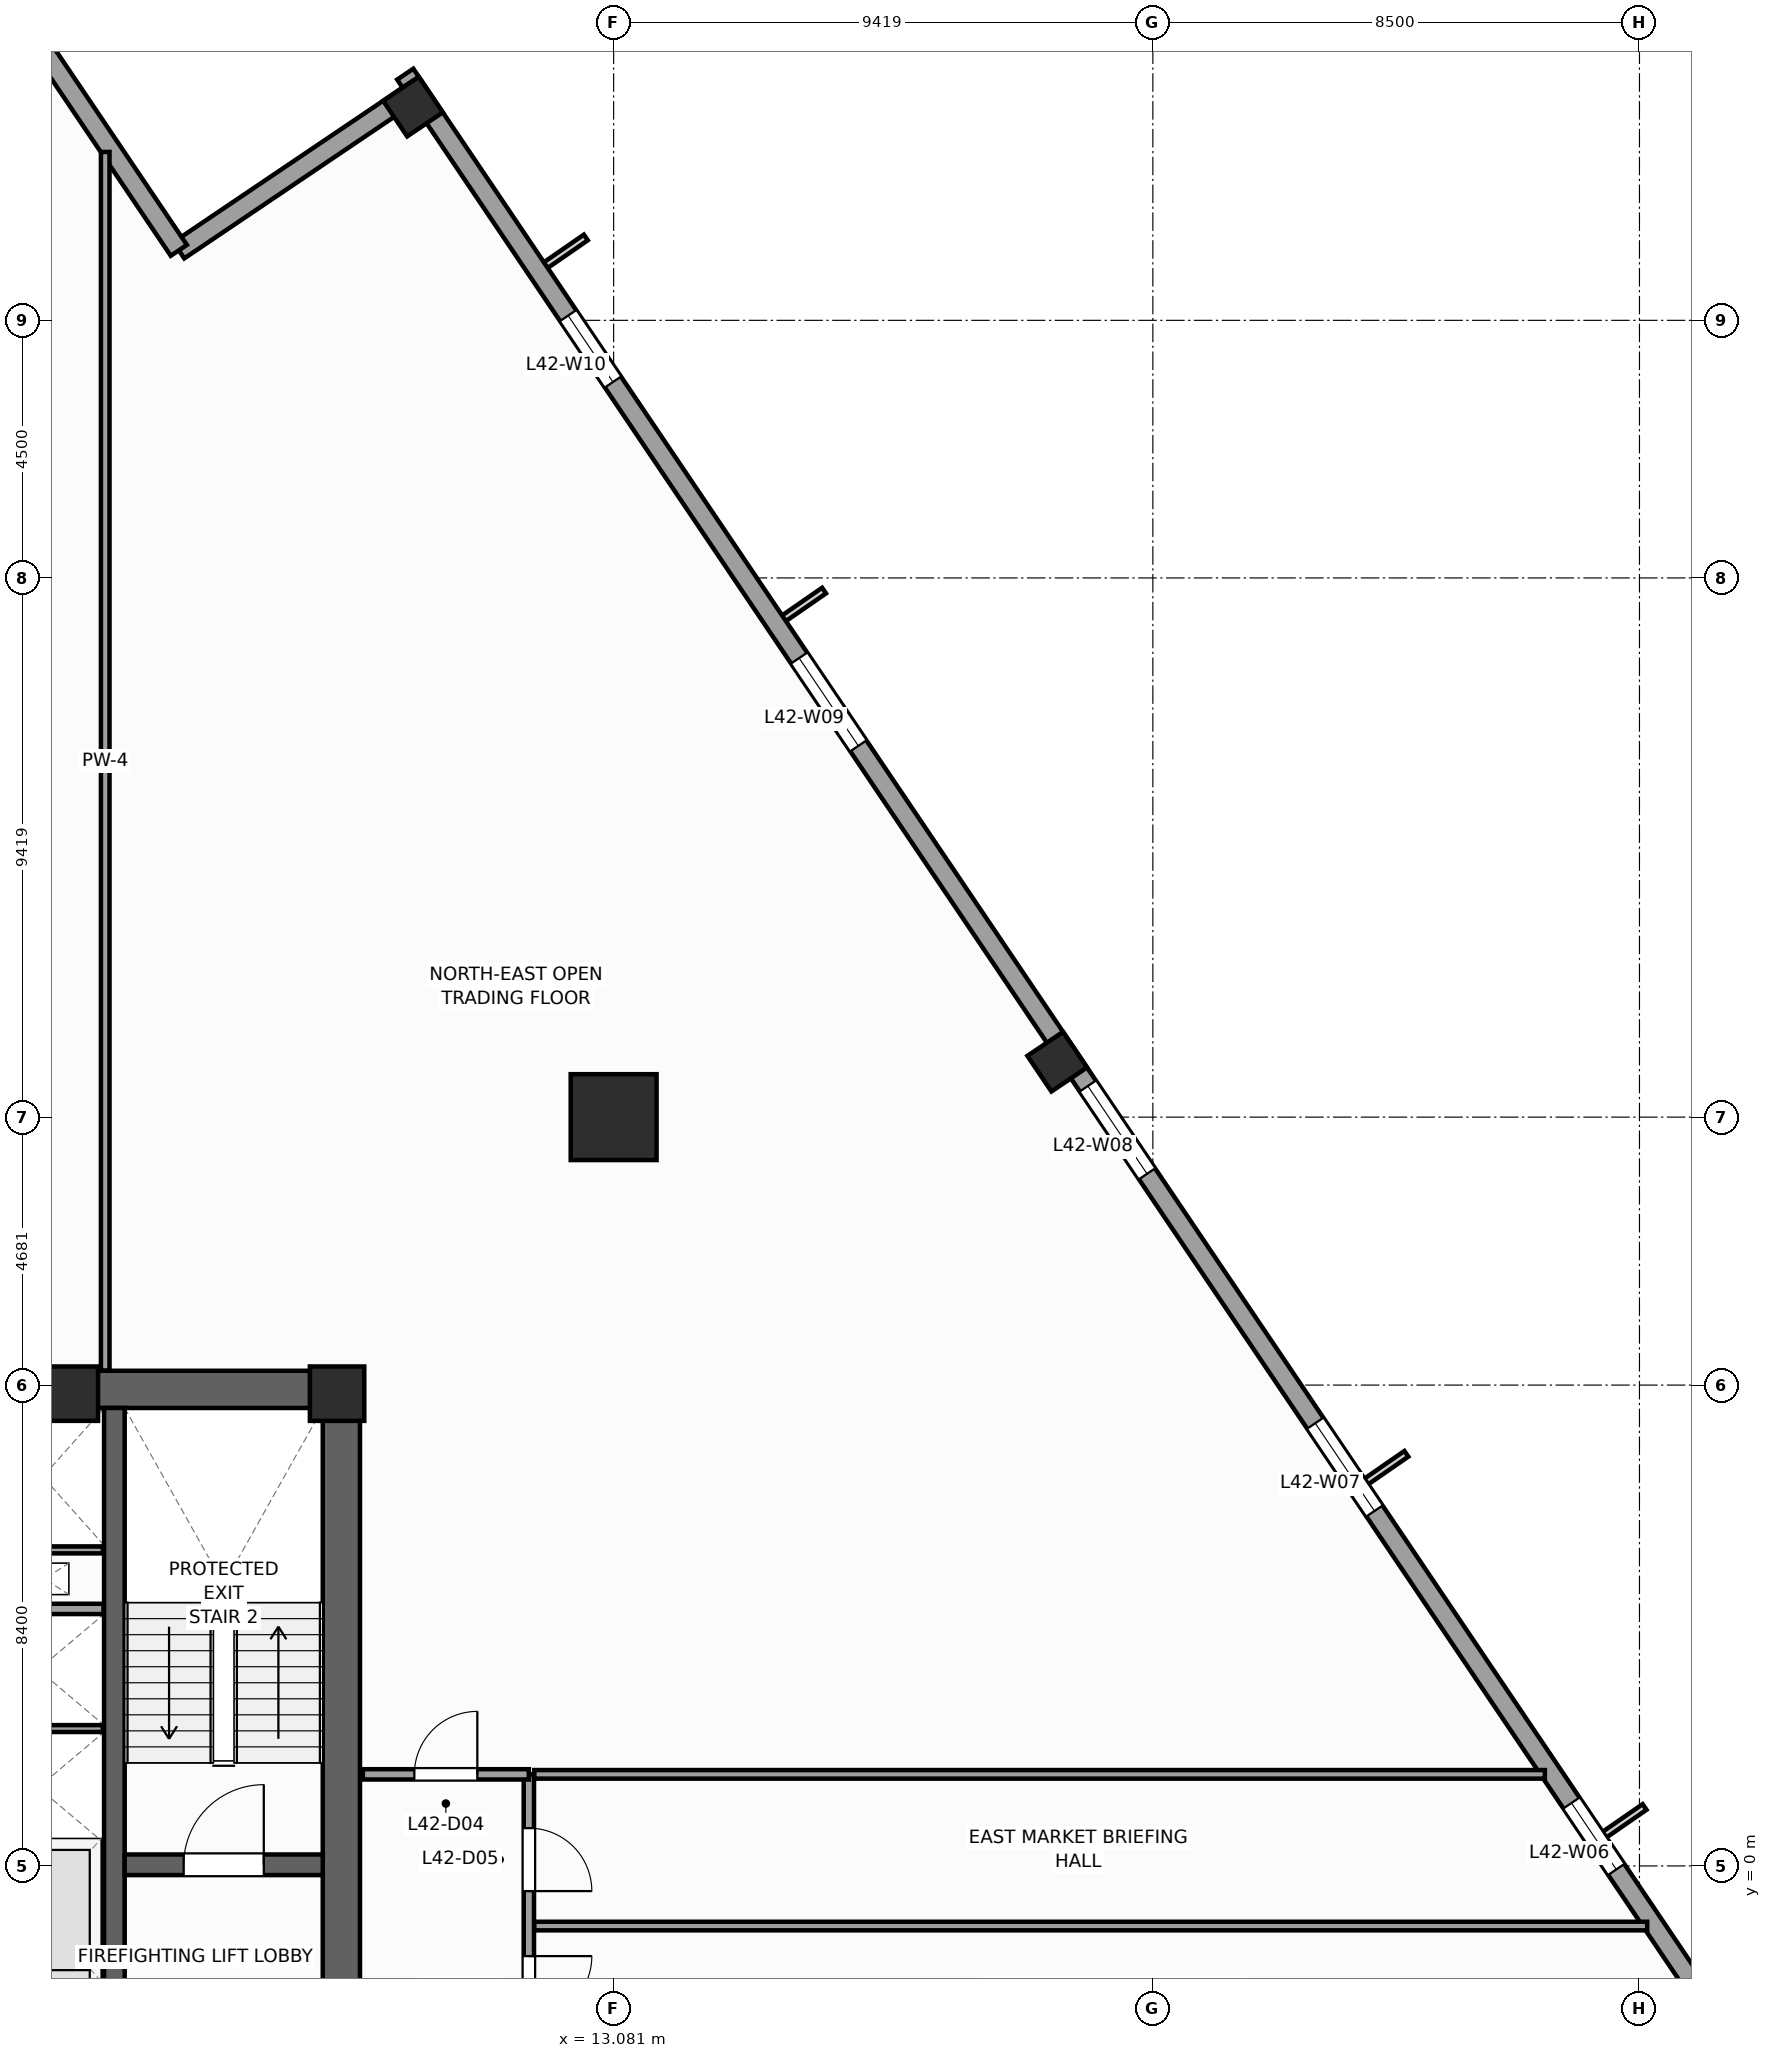
"""IFC4 building model, lengths in metres.
Left out: names, types, materials, properties, quantities, classifications, styles, units other than length and angle.
Written with IfcOpenShell. Run it as: python <this file> out.ifc"""

import sys

from ifc_helpers import new_model, si_unit, direction, frame, frame_2d, origin, origin_2d, place, context, subcontext, project, spatial, rectangle, extrude, source, transform, mapped, element, fill, save


model = new_model("IFC4")
c1 = context("Model", 3, precision=1e-05, world=origin(), true_north=direction((0.0, 1.0)))
c2 = subcontext(c1, "Body", "Model", "MODEL_VIEW")
j1 = project(units=[si_unit("LENGTHUNIT", "METRE"), si_unit("PLANEANGLEUNIT", "RADIAN")], contexts=[c1])
p1 = place(None, origin())
s1 = spatial("IfcSite", under=j1, at=p1, CompositionType="ELEMENT")
p2 = place(p1, origin())
s2 = spatial("IfcBuilding", under=s1, at=p2, CompositionType="ELEMENT")
p3 = place(p2, frame((0.0, 0.0, 176.4)))
s3 = spatial("IfcBuildingStorey", under=s2, at=p3, CompositionType="ELEMENT", Elevation=176.4)
p4 = place(p3, frame((-8.65, 8.325, 0.0), z_axis=(0.0, 0.0, 1.0), x_axis=(1.0, 0.0, 0.0)))
e1 = element("IfcWall", 1, at=p4, inside=s3, PredefinedType="SHEAR", context=c2, shape_type="SweptSolid", body=[
    extrude(rectangle(XDim=17.3, YDim=0.65, at=frame_2d((8.65, 0.0))), origin(), (0.0, 0.0, 1.0), 4.0),
])
p5 = place(p3, frame((8.325, -8.0, 0.0), z_axis=(0.0, 0.0, 1.0), x_axis=(0.0, 1.0, 0.0)))
e2 = element("IfcWall", 2, at=p5, inside=s3, PredefinedType="SHEAR", context=c2, shape_type="SweptSolid", body=[
    extrude(rectangle(XDim=16.0, YDim=0.65, at=frame_2d((8.0, 0.0))), origin(), (0.0, 0.0, 1.0), 4.0),
])
p6 = place(p5, frame((4.69, 0.0, 0.0)))
e3 = element("IfcOpeningElement", 3, at=p6, cuts=e2, PredefinedType="OPENING", context=c2, shape_type="SweptSolid", body=[
    extrude(rectangle(XDim=1.3, YDim=2.2, at=frame_2d((0.65, 1.1))), frame((0.0, 0.335, 0.0), z_axis=(0.0, -1.0, 0.0), x_axis=(1.0, 0.0, 0.0)), (0.0, 0.0, 1.0), 0.67),
])
p7 = place(p3, frame((4.36, -8.0, 0.0), z_axis=(0.0, 0.0, 1.0), x_axis=(0.0, 1.0, 0.0)))
e4 = element("IfcWall", 4, at=p7, inside=s3, PredefinedType="SHEAR", context=c2, shape_type="SweptSolid", body=[
    extrude(rectangle(XDim=16.0, YDim=0.36, at=frame_2d((8.0, 0.0))), origin(), (0.0, 0.0, 1.0), 4.0),
])
p8 = place(p3, frame((4.54, 0.02, 0.0), z_axis=(0.0, 0.0, 1.0), x_axis=(1.0, 0.0, 0.0)))
e5 = element("IfcWall", 5, at=p8, inside=s3, PredefinedType="SHEAR", context=c2, shape_type="SweptSolid", body=[
    extrude(rectangle(XDim=3.46, YDim=0.36, at=frame_2d((1.73, 0.0))), origin(), (0.0, 0.0, 1.0), 4.0),
])
p9 = place(p8, frame((1.03, 0.0, 0.0)))
e6 = element("IfcOpeningElement", 6, at=p9, cuts=e5, PredefinedType="OPENING", context=c2, shape_type="SweptSolid", body=[
    extrude(rectangle(XDim=1.4, YDim=2.2, at=frame_2d((0.7, 1.1))), frame((0.0, 0.19, 0.0), z_axis=(0.0, -1.0, 0.0), x_axis=(1.0, 0.0, 0.0)), (0.0, 0.0, 1.0), 0.38),
])
m1 = source(origin(), c2, "Body", "SweptSolid", [
    extrude(rectangle(XDim=0.95, YDim=0.95, at=origin_2d()), origin(), (0.0, 0.0, 1.0), 4.0),
])
for number, where, z_axis, x_axis in (
    (7, (8.25, 8.25, 0.0), (0.0, 0.0, 1.0), (1.0, 0.0, 0.0)),
    (8, (3.6, 8.25, 0.0), (0.0, 0.0, 1.0), (1.0, 0.0, 0.0)),
):
    element("IfcColumn", number, at=place(p3, frame(where, z_axis=z_axis, x_axis=x_axis)), inside=s3, PredefinedType="PILASTER", context=c2, shape_type="MappedRepresentation", body=[
        mapped(m1, transform((0.0, 0.0, 0.0), scale=1.0)),
    ])
m2 = source(origin(), c2, "Body", "SweptSolid", [
    extrude(rectangle(XDim=1.5, YDim=1.5, at=origin_2d()), origin(), (0.0, 0.0, 1.0), 4.0),
])
p10 = place(p3, frame((13.081, 13.081, 0.0), z_axis=(0.0, 0.0, 1.0), x_axis=(1.0, 0.0, 0.0)))
e9 = element("IfcColumn", 9, at=p10, inside=s3, PredefinedType="COLUMN", context=c2, shape_type="MappedRepresentation", body=[
    mapped(m2, transform((0.0, 0.0, 0.0), scale=1.0)),
])
m3 = source(origin(), c2, "Body", "SweptSolid", [
    extrude(rectangle(XDim=0.75, YDim=0.75, at=origin_2d()), origin(), (0.0, 0.0, 1.0), 4.0),
])
for number, where, z_axis, x_axis in (
    (10, (20.83, 14.05, 0.0), (0.0, 0.0, 1.0), (0.829, 0.559, 0.0)),
    (11, (9.576, 30.734, 0.0), (0.0, 0.0, 1.0), (0.829, 0.559, 0.0)),
):
    element("IfcColumn", number, at=place(p3, frame(where, z_axis=z_axis, x_axis=x_axis)), inside=s3, PredefinedType="COLUMN", context=c2, shape_type="MappedRepresentation", body=[
        mapped(m3, transform((0.0, 0.0, 0.0), scale=1.0)),
    ])
p11 = place(p3, frame((32.558, -2.972, 0.0), z_axis=(0.0, 0.0, 1.0), x_axis=(-0.559194910251, 0.829036218961, 0.0)))
e12 = element("IfcWall", 12, at=p11, inside=s3, PredefinedType="STANDARD", context=c2, shape_type="SweptSolid", body=[
    extrude(rectangle(XDim=41.34, YDim=0.34, at=frame_2d((20.67, 0.0))), origin(), (0.0, 0.0, 1.0), 3.04),
])
p12 = place(p11, frame((3.511, 0.0, 0.56)))
e13 = element("IfcOpeningElement", 13, at=p12, cuts=e12, PredefinedType="OPENING", context=c2, shape_type="SweptSolid", body=[
    extrude(rectangle(XDim=1.4, YDim=2.4, at=frame_2d((0.7, 1.2))), frame((0.0, 0.18, 0.0), z_axis=(0.0, -1.0, 0.0), x_axis=(1.0, 0.0, 0.0)), (0.0, 0.0, 1.0), 0.36),
])
p13 = place(p11, frame((11.064, 0.0, 0.61)))
e14 = element("IfcOpeningElement", 14, at=p13, cuts=e12, PredefinedType="OPENING", context=c2, shape_type="SweptSolid", body=[
    extrude(rectangle(XDim=1.85, YDim=2.35, at=frame_2d((0.925, 1.175))), frame((0.0, 0.18, 0.0), z_axis=(0.0, -1.0, 0.0), x_axis=(1.0, 0.0, 0.0)), (0.0, 0.0, 1.0), 0.36),
])
p14 = place(p11, frame((18.168, 0.0, 0.61)))
e15 = element("IfcOpeningElement", 15, at=p14, cuts=e12, PredefinedType="OPENING", context=c2, shape_type="SweptSolid", body=[
    extrude(rectangle(XDim=1.85, YDim=2.35, at=frame_2d((0.925, 1.175))), frame((0.0, 0.18, 0.0), z_axis=(0.0, -1.0, 0.0), x_axis=(1.0, 0.0, 0.0)), (0.0, 0.0, 1.0), 0.36),
])
p15 = place(p11, frame((27.186, 0.0, 0.61)))
e16 = element("IfcOpeningElement", 16, at=p15, cuts=e12, PredefinedType="OPENING", context=c2, shape_type="SweptSolid", body=[
    extrude(rectangle(XDim=1.85, YDim=2.35, at=frame_2d((0.925, 1.175))), frame((0.0, 0.18, 0.0), z_axis=(0.0, -1.0, 0.0), x_axis=(1.0, 0.0, 0.0)), (0.0, 0.0, 1.0), 0.36),
])
p16 = place(p11, frame((34.852, 0.0, 0.56)))
e17 = element("IfcOpeningElement", 17, at=p16, cuts=e12, PredefinedType="OPENING", context=c2, shape_type="SweptSolid", body=[
    extrude(rectangle(XDim=1.4, YDim=2.4, at=frame_2d((0.7, 1.2))), frame((0.0, 0.18, 0.0), z_axis=(0.0, -1.0, 0.0), x_axis=(1.0, 0.0, 0.0)), (0.0, 0.0, 1.0), 0.36),
])
p17 = place(p3, frame((9.631, 31.019, 0.0), z_axis=(0.0, 0.0, 1.0), x_axis=(-0.829025804298, -0.559210350234, 0.0)))
e18 = element("IfcWall", 18, at=p17, inside=s3, PredefinedType="STANDARD", context=c2, shape_type="SweptSolid", body=[
    extrude(rectangle(XDim=5.0, YDim=0.34, at=frame_2d((2.5, 0.0))), origin(), (0.0, 0.0, 1.0), 3.74),
])
p18 = place(p3, frame((5.486, 28.223, 0.0), z_axis=(0.0, 0.0, 1.0), x_axis=(-0.559171107879, 0.82905227345, 0.0)))
e19 = element("IfcWall", 19, at=p18, inside=s3, PredefinedType="STANDARD", context=c2, shape_type="SweptSolid", body=[
    extrude(rectangle(XDim=5.17, YDim=0.34, at=frame_2d((2.585, 0.0))), origin(), (0.0, 0.0, 1.0), 3.04),
])
for number, where, z_axis, x_axis in (
    (20, (1.89, 0.3, 0.0), (0.0, 0.0, 1.0), (1.0, 0.0, 0.0)),
    (21, (1.89, 4.49, 0.0), (0.0, 0.0, 1.0), (1.0, 0.0, 0.0)),
):
    element("IfcWall", number, at=place(p3, frame(where, z_axis=z_axis, x_axis=x_axis)), inside=s3, PredefinedType="PARTITIONING", context=c2, shape_type="SweptSolid", body=[
        extrude(rectangle(XDim=2.28, YDim=0.18, at=frame_2d((1.14, 0.0))), origin(), (0.0, 0.0, 1.0), 3.74),
    ])
for number, where, z_axis, x_axis in (
    (22, (1.9, -1.8, 0.0), (0.0, 0.0, 1.0), (1.0, 0.0, 0.0)),
    (23, (1.9, 2.4, 0.0), (0.0, 0.0, 1.0), (1.0, 0.0, 0.0)),
):
    element("IfcWall", number, at=place(p3, frame(where, z_axis=z_axis, x_axis=x_axis)), inside=s3, PredefinedType="PARTITIONING", context=c2, shape_type="SweptSolid", body=[
        extrude(rectangle(XDim=2.26, YDim=0.12, at=frame_2d((1.13, 0.0))), origin(), (0.0, 0.0, 1.0), 3.74),
    ])
p19 = place(p3, frame((2.06, 5.52, 0.0), z_axis=(0.0, 0.0, 1.0), x_axis=(1.0, 0.0, 0.0)))
e24 = element("IfcWall", 24, at=p19, inside=s3, PredefinedType="PARTITIONING", context=c2, shape_type="SweptSolid", body=[
    extrude(rectangle(XDim=2.1, YDim=0.12, at=frame_2d((1.05, 0.0))), origin(), (0.0, 0.0, 1.0), 3.74),
])
p20 = place(p3, frame((11.6, -10.35, 0.0), z_axis=(0.0, 0.0, 1.0), x_axis=(0.0, 1.0, 0.0)))
e25 = element("IfcWall", 25, at=p20, inside=s3, PredefinedType="PARTITIONING", context=c2, shape_type="SweptSolid", body=[
    extrude(rectangle(XDim=11.95, YDim=0.18, at=frame_2d((5.975, 0.0))), origin(), (0.0, 0.0, 1.0), 3.74),
])
p21 = place(p20, frame((9.911, 0.0, 0.0)))
e26 = element("IfcOpeningElement", 26, at=p21, cuts=e25, PredefinedType="OPENING", context=c2, shape_type="SweptSolid", body=[
    extrude(rectangle(XDim=1.1, YDim=2.2, at=frame_2d((0.55, 1.1))), frame((0.0, 0.1, 0.0), z_axis=(0.0, -1.0, 0.0), x_axis=(1.0, 0.0, 0.0)), (0.0, 0.0, 1.0), 0.2),
])
p22 = place(p20, frame((4.1, 0.0, 0.0)))
e27 = element("IfcOpeningElement", 27, at=p22, cuts=e25, PredefinedType="OPENING", context=c2, shape_type="SweptSolid", body=[
    extrude(rectangle(XDim=1.1, YDim=2.2, at=frame_2d((0.55, 1.1))), frame((0.0, 0.1, 0.0), z_axis=(0.0, -1.0, 0.0), x_axis=(1.0, 0.0, 0.0)), (0.0, 0.0, 1.0), 0.2),
])
p23 = place(p20, frame((7.675, 0.0, 0.0)))
e28 = element("IfcOpeningElement", 28, at=p23, cuts=e25, PredefinedType="OPENING", context=c2, shape_type="SweptSolid", body=[
    extrude(rectangle(XDim=1.1, YDim=2.2, at=frame_2d((0.55, 1.1))), frame((0.0, 0.1, 0.0), z_axis=(0.0, -1.0, 0.0), x_axis=(1.0, 0.0, 0.0)), (0.0, 0.0, 1.0), 0.2),
])
p24 = place(p3, frame((8.7, 1.6, 0.0), z_axis=(0.0, 0.0, 1.0), x_axis=(1.0, 0.0, 0.0)))
e29 = element("IfcWall", 29, at=p24, inside=s3, PredefinedType="PARTITIONING", context=c2, shape_type="SweptSolid", body=[
    extrude(rectangle(XDim=2.9, YDim=0.18, at=frame_2d((1.45, 0.0))), origin(), (0.0, 0.0, 1.0), 3.74),
])
p25 = place(p24, frame((0.9, 0.0, 0.0)))
e30 = element("IfcOpeningElement", 30, at=p25, cuts=e29, PredefinedType="OPENING", context=c2, shape_type="SweptSolid", body=[
    extrude(rectangle(XDim=1.1, YDim=2.2, at=frame_2d((0.55, 1.1))), frame((0.0, 0.1, 0.0), z_axis=(0.0, -1.0, 0.0), x_axis=(1.0, 0.0, 0.0)), (0.0, 0.0, 1.0), 0.2),
])
p26 = place(p3, frame((4.2, 8.655, 0.0), z_axis=(0.0, 0.0, 1.0), x_axis=(0.0, 1.0, 0.0)))
e31 = element("IfcWall", 31, at=p26, inside=s3, PredefinedType="PARTITIONING", context=c2, shape_type="SweptSolid", body=[
    extrude(rectangle(XDim=21.286, YDim=0.15, at=frame_2d((10.643, 0.0))), origin(), (0.0, 0.0, 1.0), 3.74),
])
p27 = place(p3, frame((11.695, -1.05, 0.0), z_axis=(0.0, 0.0, 1.0), x_axis=(1.0, 0.0, 0.0)))
e32 = element("IfcWall", 32, at=p27, inside=s3, PredefinedType="PARTITIONING", context=c2, shape_type="SweptSolid", body=[
    extrude(rectangle(XDim=19.44, YDim=0.15, at=frame_2d((9.72, 0.0))), origin(), (0.0, 0.0, 1.0), 3.74),
])
p28 = place(p3, frame((11.695, 1.6, 0.0), z_axis=(0.0, 0.0, 1.0), x_axis=(1.0, 0.0, 0.0)))
e33 = element("IfcWall", 33, at=p28, inside=s3, PredefinedType="PARTITIONING", context=c2, shape_type="SweptSolid", body=[
    extrude(rectangle(XDim=17.653, YDim=0.15, at=frame_2d((8.826, 0.0))), origin(), (0.0, 0.0, 1.0), 3.74),
])
m4 = source(origin(), c2, "Body", "SweptSolid", [
    extrude(rectangle(XDim=1.4, YDim=2.4, at=frame_2d((0.7, 1.2))), frame((0.0, 0.03, 0.0), z_axis=(0.0, -1.0, 0.0), x_axis=(1.0, 0.0, 0.0)), (0.0, 0.0, 1.0), 0.06),
])
p29 = place(p12, origin())
e34 = element("IfcWindow", 34, at=p29, inside=s3, PartitioningType="SINGLE_PANEL", PredefinedType="WINDOW", context=c2, shape_type="MappedRepresentation", body=[
    mapped(m4, transform((0.0, 0.0, 0.0), scale=1.0)),
])
fill(e13, e34)
m5 = source(origin(), c2, "Body", "SweptSolid", [
    extrude(rectangle(XDim=1.85, YDim=2.35, at=frame_2d((0.925, 1.175))), frame((0.0, 0.03, 0.0), z_axis=(0.0, -1.0, 0.0), x_axis=(1.0, 0.0, 0.0)), (0.0, 0.0, 1.0), 0.06),
])
p30 = place(p13, origin())
e35 = element("IfcWindow", 35, at=p30, inside=s3, PartitioningType="SINGLE_PANEL", PredefinedType="WINDOW", context=c2, shape_type="MappedRepresentation", body=[
    mapped(m5, transform((0.0, 0.0, 0.0), scale=1.0)),
])
fill(e14, e35)
p31 = place(p14, origin())
e36 = element("IfcWindow", 36, at=p31, inside=s3, PartitioningType="SINGLE_PANEL", PredefinedType="WINDOW", context=c2, shape_type="MappedRepresentation", body=[
    mapped(m5, transform((0.0, 0.0, 0.0), scale=1.0)),
])
fill(e15, e36)
p32 = place(p15, origin())
e37 = element("IfcWindow", 37, at=p32, inside=s3, PartitioningType="SINGLE_PANEL", PredefinedType="WINDOW", context=c2, shape_type="MappedRepresentation", body=[
    mapped(m5, transform((0.0, 0.0, 0.0), scale=1.0)),
])
fill(e16, e37)
p33 = place(p16, origin())
e38 = element("IfcWindow", 38, at=p33, inside=s3, PartitioningType="SINGLE_PANEL", PredefinedType="WINDOW", context=c2, shape_type="MappedRepresentation", body=[
    mapped(m4, transform((0.0, 0.0, 0.0), scale=1.0)),
])
fill(e17, e38)
m6 = source(origin(), c2, "Body", "SweptSolid", [
    extrude(rectangle(XDim=1.4, YDim=2.2, at=frame_2d((0.7, 1.1))), frame((0.0, 0.025, 0.0), z_axis=(0.0, -1.0, 0.0), x_axis=(1.0, 0.0, 0.0)), (0.0, 0.0, 1.0), 0.05),
])
p34 = place(p9, origin())
e39 = element("IfcDoor", 39, at=p34, inside=s3, OperationType="SINGLE_SWING_RIGHT", PredefinedType="DOOR", context=c2, shape_type="MappedRepresentation", body=[
    mapped(m6, transform((0.0, 0.0, 0.0), scale=1.0)),
])
fill(e6, e39)
m7 = source(origin(), c2, "Body", "SweptSolid", [
    extrude(rectangle(XDim=1.1, YDim=2.2, at=frame_2d((0.55, 1.1))), frame((0.0, 0.025, 0.0), z_axis=(0.0, -1.0, 0.0), x_axis=(1.0, 0.0, 0.0)), (0.0, 0.0, 1.0), 0.05),
])
p35 = place(p25, origin())
e40 = element("IfcDoor", 40, at=p35, inside=s3, OperationType="SINGLE_SWING_RIGHT", PredefinedType="DOOR", context=c2, shape_type="MappedRepresentation", body=[
    mapped(m7, transform((0.0, 0.0, 0.0), scale=1.0)),
])
fill(e30, e40)
p36 = place(p21, frame((1.1, 0.0, 0.0), z_axis=(0.0, 0.0, 1.0), x_axis=(-1.0, 0.0, 0.0)))
e41 = element("IfcDoor", 41, at=p36, inside=s3, OperationType="SINGLE_SWING_LEFT", PredefinedType="DOOR", context=c2, shape_type="MappedRepresentation", body=[
    mapped(m7, transform((0.0, 0.0, 0.0), scale=1.0)),
])
fill(e26, e41)
p37 = place(p23, frame((1.1, 0.0, 0.0), z_axis=(0.0, 0.0, 1.0), x_axis=(-1.0, 0.0, 0.0)))
e42 = element("IfcDoor", 42, at=p37, inside=s3, OperationType="SINGLE_SWING_RIGHT", PredefinedType="DOOR", context=c2, shape_type="MappedRepresentation", body=[
    mapped(m7, transform((0.0, 0.0, 0.0), scale=1.0)),
])
fill(e28, e42)
save(model, sys.argv[1])
